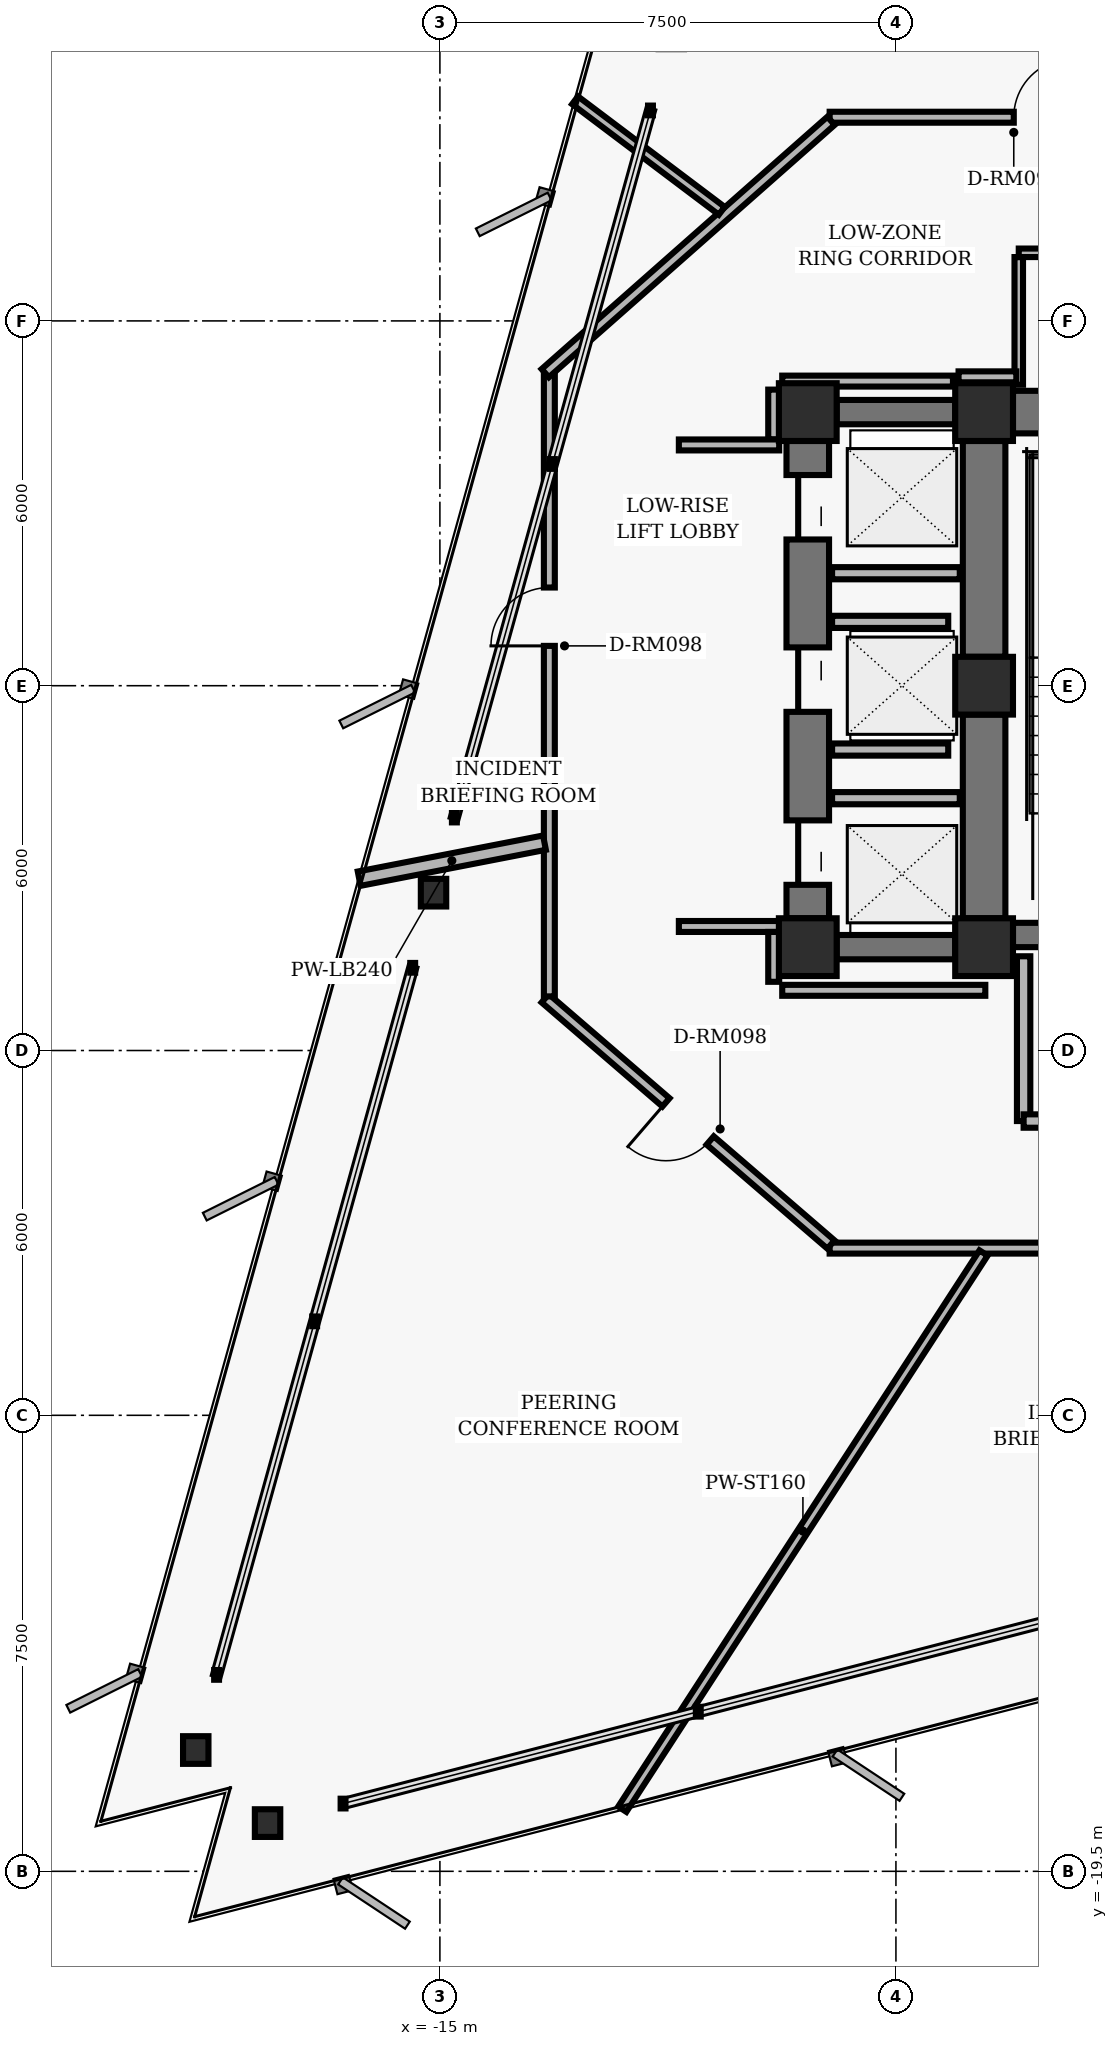
"""IFC4 building model, lengths in metres.
Left out: names, types, materials, properties, quantities, classifications, styles, units other than length and angle.
Written with IfcOpenShell. Run it as: python <this file> out.ifc"""

import sys

from ifc_helpers import new_model, si_unit, direction, frame, frame_2d, origin, origin_2d, place, context, subcontext, project, spatial, rectangle, hollow_rectangle, i_section, extrude, element, fill, save


model = new_model("IFC4")
c1 = context("Model", 3, precision=1e-05, world=origin(), true_north=direction((0.0, 1.0)))
c2 = subcontext(c1, "Body", "Model", "MODEL_VIEW")
j1 = project(units=[si_unit("LENGTHUNIT", "METRE"), si_unit("PLANEANGLEUNIT", "RADIAN")], contexts=[c1])
p1 = place(None, origin())
s1 = spatial("IfcSite", under=j1, at=p1, CompositionType="ELEMENT")
p2 = place(p1, origin())
s2 = spatial("IfcBuilding", under=s1, at=p2, CompositionType="ELEMENT")
p3 = place(p2, frame((0.0, 0.0, 82.56)))
s3 = spatial("IfcBuildingStorey", under=s2, at=p3, CompositionType="ELEMENT", Elevation=82.56)
for number, where, z_axis, x_axis in (
    (1, (-6.05, 4.5, 0.0), (0.0, 0.0, 1.0), (1.0, 0.0, 0.0)),
    (2, (-6.05, 0.0, 0.0), (0.0, 0.0, 1.0), (1.0, 0.0, 0.0)),
    (3, (-6.05, -4.3, 0.0), (0.0, 0.0, 1.0), (1.0, 0.0, 0.0)),
    (4, (-8.95, 4.5, 0.0), (0.0, 0.0, 1.0), (1.0, 0.0, 0.0)),
    (5, (-8.95, -4.3, 0.0), (0.0, 0.0, 1.0), (1.0, 0.0, 0.0)),
):
    element("IfcColumn", number, at=place(p3, frame(where, z_axis=z_axis, x_axis=x_axis)), inside=s3, PredefinedType="COLUMN", context=c2, shape_type="SweptSolid", body=[
        extrude(hollow_rectangle(XDim=0.95, YDim=0.95, WallThickness=0.06, InnerFilletRadius=0.02, OuterFilletRadius=0.04, at=origin_2d()), origin(), (0.0, 0.0, 1.0), 3.04),
    ])
p4 = place(p3, frame((-6.05, 0.475, 0.0), z_axis=(0.0, 0.0, 1.0), x_axis=(0.0, 1.0, 0.0)))
e6 = element("IfcWall", 6, at=p4, inside=s3, PredefinedType="SHEAR", context=c2, shape_type="SweptSolid", body=[
    extrude(rectangle(XDim=3.55, YDim=0.7, at=frame_2d((1.775, 0.0))), origin(), (0.0, 0.0, 1.0), 2.788),
])
p5 = place(p3, frame((-6.05, -3.825, 0.0), z_axis=(0.0, 0.0, 1.0), x_axis=(0.0, 1.0, 0.0)))
e7 = element("IfcWall", 7, at=p5, inside=s3, PredefinedType="SHEAR", context=c2, shape_type="SweptSolid", body=[
    extrude(rectangle(XDim=3.35, YDim=0.7, at=frame_2d((1.675, 0.0))), origin(), (0.0, 0.0, 1.0), 2.788),
])
p6 = place(p3, frame((-5.575, -4.1, 0.0), z_axis=(0.0, 0.0, 1.0), x_axis=(1.0, 0.0, 0.0)))
e8 = element("IfcWall", 8, at=p6, inside=s3, PredefinedType="SHEAR", context=c2, shape_type="SweptSolid", body=[
    extrude(rectangle(XDim=11.15, YDim=0.4, at=frame_2d((5.575, 0.0))), origin(), (0.0, 0.0, 1.0), 2.788),
])
p7 = place(p6, frame((1.305, 0.0, 0.0)))
e9 = element("IfcOpeningElement", 9, at=p7, cuts=e8, PredefinedType="OPENING", context=c2, shape_type="SweptSolid", body=[
    extrude(rectangle(XDim=1.1, YDim=2.04, at=frame_2d((0.55, 1.02))), frame((0.0, 0.21, 0.0), z_axis=(0.0, -1.0, 0.0), x_axis=(1.0, 0.0, 0.0)), (0.0, 0.0, 1.0), 0.42),
])
p8 = place(p6, frame((8.745, 0.0, 0.0)))
e10 = element("IfcOpeningElement", 10, at=p8, cuts=e8, PredefinedType="OPENING", context=c2, shape_type="SweptSolid", body=[
    extrude(rectangle(XDim=1.1, YDim=2.04, at=frame_2d((0.55, 1.02))), frame((0.0, 0.21, 0.0), z_axis=(0.0, -1.0, 0.0), x_axis=(1.0, 0.0, 0.0)), (0.0, 0.0, 1.0), 0.42),
])
p9 = place(p6, frame((4.045, 0.0, 0.0)))
e11 = element("IfcOpeningElement", 11, at=p9, cuts=e8, PredefinedType="OPENING", context=c2, shape_type="SweptSolid", body=[
    extrude(rectangle(XDim=1.06, YDim=2.04, at=frame_2d((0.53, 1.02))), frame((0.0, 0.21, 0.0), z_axis=(0.0, -1.0, 0.0), x_axis=(1.0, 0.0, 0.0)), (0.0, 0.0, 1.0), 0.42),
])
p10 = place(p6, frame((6.045, 0.0, 0.0)))
e12 = element("IfcOpeningElement", 12, at=p10, cuts=e8, PredefinedType="OPENING", context=c2, shape_type="SweptSolid", body=[
    extrude(rectangle(XDim=1.06, YDim=2.04, at=frame_2d((0.53, 1.02))), frame((0.0, 0.21, 0.0), z_axis=(0.0, -1.0, 0.0), x_axis=(1.0, 0.0, 0.0)), (0.0, 0.0, 1.0), 0.42),
])
p11 = place(p3, frame((-5.575, 4.5, 0.0), z_axis=(0.0, 0.0, 1.0), x_axis=(1.0, 0.0, 0.0)))
e13 = element("IfcWall", 13, at=p11, inside=s3, PredefinedType="SHEAR", context=c2, shape_type="SweptSolid", body=[
    extrude(rectangle(XDim=3.525, YDim=0.7, at=frame_2d((1.762, 0.0))), origin(), (0.0, 0.0, 1.0), 2.788),
])
p12 = place(p3, frame((-8.95, -3.825, 0.0), z_axis=(0.0, 0.0, 1.0), x_axis=(0.0, 1.0, 0.0)))
e14 = element("IfcWall", 14, at=p12, inside=s3, PredefinedType="SHEAR", context=c2, shape_type="SweptSolid", body=[
    extrude(rectangle(XDim=7.85, YDim=0.7, at=frame_2d((3.925, 0.0))), origin(), (0.0, 0.0, 1.0), 2.788),
])
p13 = place(p12, frame((0.55, 0.0, 0.0)))
e15 = element("IfcOpeningElement", 15, at=p13, cuts=e14, PredefinedType="OPENING", context=c2, shape_type="SweptSolid", body=[
    extrude(rectangle(XDim=1.06, YDim=2.04, at=frame_2d((0.53, 1.02))), frame((0.0, 0.36, 0.0), z_axis=(0.0, -1.0, 0.0), x_axis=(1.0, 0.0, 0.0)), (0.0, 0.0, 1.0), 0.72),
])
p14 = place(p12, frame((3.395, 0.0, 0.0)))
e16 = element("IfcOpeningElement", 16, at=p14, cuts=e14, PredefinedType="OPENING", context=c2, shape_type="SweptSolid", body=[
    extrude(rectangle(XDim=1.06, YDim=2.04, at=frame_2d((0.53, 1.02))), frame((0.0, 0.36, 0.0), z_axis=(0.0, -1.0, 0.0), x_axis=(1.0, 0.0, 0.0)), (0.0, 0.0, 1.0), 0.72),
])
p15 = place(p12, frame((6.23, 0.0, 0.0)))
e17 = element("IfcOpeningElement", 17, at=p15, cuts=e14, PredefinedType="OPENING", context=c2, shape_type="SweptSolid", body=[
    extrude(rectangle(XDim=1.06, YDim=2.04, at=frame_2d((0.53, 1.02))), frame((0.0, 0.36, 0.0), z_axis=(0.0, -1.0, 0.0), x_axis=(1.0, 0.0, 0.0)), (0.0, 0.0, 1.0), 0.72),
])
for number, where, z_axis, x_axis in (
    (18, (-8.475, 4.5, 0.0), (0.0, 0.0, 1.0), (1.0, 0.0, 0.0)),
    (19, (-8.475, -4.3, 0.0), (0.0, 0.0, 1.0), (1.0, 0.0, 0.0)),
):
    element("IfcWall", number, at=place(p3, frame(where, z_axis=z_axis, x_axis=x_axis)), inside=s3, PredefinedType="SHEAR", context=c2, shape_type="SweptSolid", body=[
        extrude(rectangle(XDim=1.95, YDim=0.4, at=frame_2d((0.975, 0.0))), origin(), (0.0, 0.0, 1.0), 2.788),
    ])
for number, where, z_axis, x_axis in (
    (20, (-15.104, -3.404, 0.0), (0.0, 0.0, 1.0), (1.0, 0.0, 0.0)),
    (21, (-19.015, -17.505, 0.0), (0.0, 0.0, 1.0), (1.0, 0.0, 0.0)),
    (22, (-17.834, -18.707, 0.0), (0.0, 0.0, 1.0), (1.0, 0.0, 0.0)),
):
    element("IfcColumn", number, at=place(p3, frame(where, z_axis=z_axis, x_axis=x_axis)), inside=s3, PredefinedType="COLUMN", context=c2, shape_type="SweptSolid", body=[
        extrude(i_section(OverallWidth=0.418, OverallDepth=0.455, WebThickness=0.042, FlangeThickness=0.068, FilletRadius=0.025, at=origin_2d()), origin(), (0.0, 0.0, 1.0), 3.04),
    ])
p16 = place(p3, frame((-5.4, -7.16, 0.0), z_axis=(0.0, 0.0, 1.0), x_axis=(0.0, 1.0, 0.0)))
e23 = element("IfcWall", 23, at=p16, inside=s3, PredefinedType="PARTITIONING", context=c2, shape_type="SweptSolid", body=[
    extrude(rectangle(XDim=2.71, YDim=0.22, at=frame_2d((1.355, 0.0))), origin(), (0.0, 0.0, 1.0), 2.763),
])
p17 = place(p3, frame((-5.4, -7.16, 0.0), z_axis=(0.0, 0.0, 1.0), x_axis=(1.0, 0.0, 0.0)))
e24 = element("IfcWall", 24, at=p17, inside=s3, PredefinedType="PARTITIONING", context=c2, shape_type="SweptSolid", body=[
    extrude(rectangle(XDim=5.4, YDim=0.22, at=frame_2d((2.7, 0.0))), origin(), (0.0, 0.0, 1.0), 2.763),
])
p18 = place(p17, frame((2.05, 0.0, 0.0)))
e25 = element("IfcOpeningElement", 25, at=p18, cuts=e24, PredefinedType="OPENING", context=c2, shape_type="SweptSolid", body=[
    extrude(rectangle(XDim=1.12, YDim=2.02, at=frame_2d((0.56, 1.01))), frame((0.0, 0.12, 0.0), z_axis=(0.0, -1.0, 0.0), x_axis=(1.0, 0.0, 0.0)), (0.0, 0.0, 1.0), 0.24),
])
p19 = place(p3, frame((-5.48, 4.95, 0.0), z_axis=(0.0, 0.0, 1.0), x_axis=(0.0, 1.0, 0.0)))
e26 = element("IfcWall", 26, at=p19, inside=s3, PredefinedType="PARTITIONING", context=c2, shape_type="SweptSolid", body=[
    extrude(rectangle(XDim=2.1, YDim=0.14, at=frame_2d((1.05, 0.0))), origin(), (0.0, 0.0, 1.0), 2.763),
])
p20 = place(p3, frame((-5.48, 7.12, 0.0), z_axis=(0.0, 0.0, 1.0), x_axis=(1.0, 0.0, 0.0)))
e27 = element("IfcWall", 27, at=p20, inside=s3, PredefinedType="PARTITIONING", context=c2, shape_type="SweptSolid", body=[
    extrude(rectangle(XDim=3.36, YDim=0.14, at=frame_2d((1.68, 0.0))), origin(), (0.0, 0.0, 1.0), 2.763),
])
p21 = place(p20, frame((1.24, 0.0, 0.0)))
e28 = element("IfcOpeningElement", 28, at=p21, cuts=e27, PredefinedType="OPENING", context=c2, shape_type="SweptSolid", body=[
    extrude(rectangle(XDim=0.88, YDim=2.02, at=frame_2d((0.44, 1.01))), frame((0.0, 0.08, 0.0), z_axis=(0.0, -1.0, 0.0), x_axis=(1.0, 0.0, 0.0)), (0.0, 0.0, 1.0), 0.16),
])
for number, where, z_axis, x_axis in (
    (29, (-8.55, -1.85, 0.0), (0.0, 0.0, 1.0), (1.0, 0.0, 0.0)),
    (30, (-8.55, 1.85, 0.0), (0.0, 0.0, 1.0), (1.0, 0.0, 0.0)),
):
    element("IfcWall", number, at=place(p3, frame(where, z_axis=z_axis, x_axis=x_axis)), inside=s3, PredefinedType="PARTITIONING", context=c2, shape_type="SweptSolid", body=[
        extrude(rectangle(XDim=2.1, YDim=0.2, at=frame_2d((1.05, 0.0))), origin(), (0.0, 0.0, 1.0), 2.763),
    ])
for number, where, z_axis, x_axis in (
    (31, (-8.55, -1.05, 0.0), (0.0, 0.0, 1.0), (1.0, 0.0, 0.0)),
    (32, (-8.55, 1.05, 0.0), (0.0, 0.0, 1.0), (1.0, 0.0, 0.0)),
):
    element("IfcWall", number, at=place(p3, frame(where, z_axis=z_axis, x_axis=x_axis)), inside=s3, PredefinedType="PARTITIONING", context=c2, shape_type="SweptSolid", body=[
        extrude(rectangle(XDim=1.91, YDim=0.2, at=frame_2d((0.955, 0.0))), origin(), (0.0, 0.0, 1.0), 2.763),
    ])
p22 = place(p3, frame((-8.59, 9.35, 0.0), z_axis=(0.0, 0.0, 1.0), x_axis=(1.0, 0.0, 0.0)))
e33 = element("IfcWall", 33, at=p22, inside=s3, PredefinedType="PARTITIONING", context=c2, shape_type="SweptSolid", body=[
    extrude(rectangle(XDim=17.18, YDim=0.18, at=frame_2d((8.59, 0.0))), origin(), (0.0, 0.0, 1.0), 2.277),
])
p23 = place(p22, frame((10.261, 0.0, 0.0)))
e34 = element("IfcOpeningElement", 34, at=p23, cuts=e33, PredefinedType="OPENING", context=c2, shape_type="SweptSolid", body=[
    extrude(rectangle(XDim=0.96, YDim=2.02, at=frame_2d((0.48, 1.01))), frame((0.0, 0.1, 0.0), z_axis=(0.0, -1.0, 0.0), x_axis=(1.0, 0.0, 0.0)), (0.0, 0.0, 1.0), 0.2),
])
p24 = place(p22, frame((3.028, 0.0, 0.0)))
e35 = element("IfcOpeningElement", 35, at=p24, cuts=e33, PredefinedType="OPENING", context=c2, shape_type="SweptSolid", body=[
    extrude(rectangle(XDim=0.96, YDim=2.02, at=frame_2d((0.48, 1.01))), frame((0.0, 0.1, 0.0), z_axis=(0.0, -1.0, 0.0), x_axis=(1.0, 0.0, 0.0)), (0.0, 0.0, 1.0), 0.2),
])
p25 = place(p3, frame((8.41, -9.25, 0.0), z_axis=(0.0, 0.0, 1.0), x_axis=(-1.0, 0.0, 0.0)))
e36 = element("IfcWall", 36, at=p25, inside=s3, PredefinedType="PARTITIONING", context=c2, shape_type="SweptSolid", body=[
    extrude(rectangle(XDim=17.0, YDim=0.18, at=frame_2d((8.5, 0.0))), origin(), (0.0, 0.0, 1.0), 2.277),
])
p26 = place(p25, frame((9.888, 0.0, 0.0)))
e37 = element("IfcOpeningElement", 37, at=p26, cuts=e36, PredefinedType="OPENING", context=c2, shape_type="SweptSolid", body=[
    extrude(rectangle(XDim=0.96, YDim=2.02, at=frame_2d((0.48, 1.01))), frame((0.0, 0.1, 0.0), z_axis=(0.0, -1.0, 0.0), x_axis=(1.0, 0.0, 0.0)), (0.0, 0.0, 1.0), 0.2),
])
p27 = place(p25, frame((2.777, 0.0, 0.0)))
e38 = element("IfcOpeningElement", 38, at=p27, cuts=e36, PredefinedType="OPENING", context=c2, shape_type="SweptSolid", body=[
    extrude(rectangle(XDim=0.96, YDim=2.02, at=frame_2d((0.48, 1.01))), frame((0.0, 0.1, 0.0), z_axis=(0.0, -1.0, 0.0), x_axis=(1.0, 0.0, 0.0)), (0.0, 0.0, 1.0), 0.2),
])
p28 = place(p3, frame((-8.568, -9.191, 0.0), z_axis=(0.0, 0.0, 1.0), x_axis=(-0.757556899173, 0.652769135694, 0.0)))
e39 = element("IfcWall", 39, at=p28, inside=s3, PredefinedType="PARTITIONING", context=c2, shape_type="SweptSolid", body=[
    extrude(rectangle(XDim=6.204, YDim=0.18, at=frame_2d((3.102, 0.0))), origin(), (0.0, 0.0, 1.0), 2.763),
])
p29 = place(p28, frame((2.622, 0.0, 0.0)))
e40 = element("IfcOpeningElement", 40, at=p29, cuts=e39, PredefinedType="OPENING", context=c2, shape_type="SweptSolid", body=[
    extrude(rectangle(XDim=0.96, YDim=2.02, at=frame_2d((0.48, 1.01))), frame((0.0, 0.1, 0.0), z_axis=(0.0, -1.0, 0.0), x_axis=(1.0, 0.0, 0.0)), (0.0, 0.0, 1.0), 0.2),
])
p30 = place(p3, frame((-13.2, -5.11, 0.0), z_axis=(0.0, 0.0, 1.0), x_axis=(0.0, 1.0, 0.0)))
e41 = element("IfcWall", 41, at=p30, inside=s3, PredefinedType="PARTITIONING", context=c2, shape_type="SweptSolid", body=[
    extrude(rectangle(XDim=10.22, YDim=0.18, at=frame_2d((5.11, 0.0))), origin(), (0.0, 0.0, 1.0), 2.143),
])
p31 = place(p30, frame((5.765, 0.0, 0.0)))
e42 = element("IfcOpeningElement", 42, at=p31, cuts=e41, PredefinedType="OPENING", context=c2, shape_type="SweptSolid", body=[
    extrude(rectangle(XDim=0.96, YDim=2.02, at=frame_2d((0.48, 1.01))), frame((0.0, 0.1, 0.0), z_axis=(0.0, -1.0, 0.0), x_axis=(1.0, 0.0, 0.0)), (0.0, 0.0, 1.0), 0.2),
])
p32 = place(p3, frame((-13.268, 5.14, 0.0), z_axis=(0.0, 0.0, 1.0), x_axis=(0.749626463267, 0.66186113768, 0.0)))
e43 = element("IfcWall", 43, at=p32, inside=s3, PredefinedType="PARTITIONING", context=c2, shape_type="SweptSolid", body=[
    extrude(rectangle(XDim=6.27, YDim=0.18, at=frame_2d((3.135, 0.0))), origin(), (0.0, 0.0, 1.0), 2.763),
])
p33 = place(p3, frame((-9.51, 4.87, 0.0), z_axis=(0.0, 0.0, 1.0), x_axis=(0.0, -1.0, 0.0)))
e44 = element("IfcWall", 44, at=p33, inside=s3, PredefinedType="PARTITIONING", context=c2, shape_type="SweptSolid", body=[
    extrude(rectangle(XDim=0.82, YDim=0.18, at=frame_2d((0.41, 0.0))), origin(), (0.0, 0.0, 1.0), 2.277),
])
p34 = place(p3, frame((-9.42, 3.96, 0.0), z_axis=(0.0, 0.0, 1.0), x_axis=(-1.0, 0.0, 0.0)))
e45 = element("IfcWall", 45, at=p34, inside=s3, PredefinedType="PARTITIONING", context=c2, shape_type="SweptSolid", body=[
    extrude(rectangle(XDim=1.65, YDim=0.18, at=frame_2d((0.825, 0.0))), origin(), (0.0, 0.0, 1.0), 2.763),
])
p35 = place(p3, frame((-11.07, -3.96, 0.0), z_axis=(0.0, 0.0, 1.0), x_axis=(1.0, 0.0, 0.0)))
e46 = element("IfcWall", 46, at=p35, inside=s3, PredefinedType="PARTITIONING", context=c2, shape_type="SweptSolid", body=[
    extrude(rectangle(XDim=1.65, YDim=0.18, at=frame_2d((0.825, 0.0))), origin(), (0.0, 0.0, 1.0), 2.048),
])
p36 = place(p3, frame((-9.51, -4.05, 0.0), z_axis=(0.0, 0.0, 1.0), x_axis=(0.0, -1.0, 0.0)))
e47 = element("IfcWall", 47, at=p36, inside=s3, PredefinedType="PARTITIONING", context=c2, shape_type="SweptSolid", body=[
    extrude(rectangle(XDim=0.82, YDim=0.18, at=frame_2d((0.41, 0.0))), origin(), (0.0, 0.0, 1.0), 2.763),
])
p37 = place(p3, frame((-9.37, -5.01, 0.0), z_axis=(0.0, 0.0, 1.0), x_axis=(1.0, 0.0, 0.0)))
e48 = element("IfcWall", 48, at=p37, inside=s3, PredefinedType="PARTITIONING", context=c2, shape_type="SweptSolid", body=[
    extrude(rectangle(XDim=3.34, YDim=0.18, at=frame_2d((1.67, 0.0))), origin(), (0.0, 0.0, 1.0), 2.763),
])
p38 = place(p3, frame((-5.52, 5.08, 0.0), z_axis=(0.0, 0.0, 1.0), x_axis=(-1.0, 0.0, 0.0)))
e49 = element("IfcWall", 49, at=p38, inside=s3, PredefinedType="PARTITIONING", context=c2, shape_type="SweptSolid", body=[
    extrude(rectangle(XDim=0.95, YDim=0.18, at=frame_2d((0.475, 0.0))), origin(), (0.0, 0.0, 1.0), 2.763),
])
p39 = place(p3, frame((-6.562, 5.01, 0.0), z_axis=(0.0, 0.0, 1.0), x_axis=(-1.0, 0.0, 0.0)))
e50 = element("IfcWall", 50, at=p39, inside=s3, PredefinedType="PARTITIONING", context=c2, shape_type="SweptSolid", body=[
    extrude(rectangle(XDim=2.808, YDim=0.18, at=frame_2d((1.404, 0.0))), origin(), (0.0, 0.0, 1.0), 2.763),
])
p40 = place(p3, frame((-13.28, -2.581, 0.0), z_axis=(0.0, 0.0, 1.0), x_axis=(-0.98161907283, -0.190850716155, 0.0)))
e51 = element("IfcWall", 51, at=p40, inside=s3, PredefinedType="PARTITIONING", context=c2, shape_type="SweptSolid", body=[
    extrude(rectangle(XDim=3.105, YDim=0.24, at=frame_2d((1.552, 0.0))), origin(), (0.0, 0.0, 1.0), 2.763),
])
p41 = place(p3, frame((-6.059, -9.33, 0.0), z_axis=(0.0, 0.0, 1.0), x_axis=(-0.544635087887, -0.838673131227, 0.0)))
e52 = element("IfcWall", 52, at=p41, inside=s3, PredefinedType="PARTITIONING", context=c2, shape_type="SweptSolid", body=[
    extrude(rectangle(XDim=10.908, YDim=0.16, at=frame_2d((5.454, 0.0))), origin(), (0.0, 0.0, 1.0), 2.763),
])
p42 = place(p3, frame((-1.833, 9.43, 0.0), z_axis=(0.0, 0.0, 1.0), x_axis=(-0.190802669454, 0.981628413061, 0.0)))
e53 = element("IfcWall", 53, at=p42, inside=s3, PredefinedType="PARTITIONING", context=c2, shape_type="SweptSolid", body=[
    extrude(rectangle(XDim=17.364, YDim=0.24, at=frame_2d((8.682, 0.0))), origin(), (0.0, 0.0, 1.0), 2.763),
])
p43 = place(p3, frame((-10.365, 7.81, 0.0), z_axis=(0.0, 0.0, 1.0), x_axis=(-0.79865006228, 0.601795711201, 0.0)))
e54 = element("IfcWall", 54, at=p43, inside=s3, PredefinedType="PARTITIONING", context=c2, shape_type="SweptSolid", body=[
    extrude(rectangle(XDim=3.021, YDim=0.16, at=frame_2d((1.511, 0.0))), origin(), (0.0, 0.0, 1.0), 2.763),
])
p44 = place(p13, origin())
e55 = element("IfcDoor", 55, at=p44, inside=s3, OperationType="SLIDING_TO_LEFT", PredefinedType="DOOR", context=c2, shape_type="SweptSolid", body=[
    extrude(rectangle(XDim=1.06, YDim=2.04, at=frame_2d((0.53, 1.02))), frame((0.0, 0.025, 0.0), z_axis=(0.0, -1.0, 0.0), x_axis=(1.0, 0.0, 0.0)), (0.0, 0.0, 1.0), 0.05),
])
fill(e15, e55)
p45 = place(p14, origin())
e56 = element("IfcDoor", 56, at=p45, inside=s3, OperationType="SLIDING_TO_RIGHT", PredefinedType="DOOR", context=c2, shape_type="SweptSolid", body=[
    extrude(rectangle(XDim=1.06, YDim=2.04, at=frame_2d((0.53, 1.02))), frame((0.0, 0.025, 0.0), z_axis=(0.0, -1.0, 0.0), x_axis=(1.0, 0.0, 0.0)), (0.0, 0.0, 1.0), 0.05),
])
fill(e16, e56)
p46 = place(p15, origin())
e57 = element("IfcDoor", 57, at=p46, inside=s3, OperationType="SLIDING_TO_LEFT", PredefinedType="DOOR", context=c2, shape_type="SweptSolid", body=[
    extrude(rectangle(XDim=1.06, YDim=2.04, at=frame_2d((0.53, 1.02))), frame((0.0, 0.025, 0.0), z_axis=(0.0, -1.0, 0.0), x_axis=(1.0, 0.0, 0.0)), (0.0, 0.0, 1.0), 0.05),
])
fill(e17, e57)
p47 = place(p29, origin())
e58 = element("IfcDoor", 58, at=p47, inside=s3, OperationType="SINGLE_SWING_RIGHT", PredefinedType="DOOR", context=c2, shape_type="SweptSolid", body=[
    extrude(rectangle(XDim=0.96, YDim=2.02, at=frame_2d((0.48, 1.01))), frame((0.0, 0.025, 0.0), z_axis=(0.0, -1.0, 0.0), x_axis=(1.0, 0.0, 0.0)), (0.0, 0.0, 1.0), 0.05),
])
fill(e40, e58)
p48 = place(p24, origin())
e59 = element("IfcDoor", 59, at=p48, inside=s3, OperationType="SINGLE_SWING_RIGHT", PredefinedType="DOOR", context=c2, shape_type="SweptSolid", body=[
    extrude(rectangle(XDim=0.96, YDim=2.02, at=frame_2d((0.48, 1.01))), frame((0.0, 0.025, 0.0), z_axis=(0.0, -1.0, 0.0), x_axis=(1.0, 0.0, 0.0)), (0.0, 0.0, 1.0), 0.05),
])
fill(e35, e59)
p49 = place(p31, origin())
e60 = element("IfcDoor", 60, at=p49, inside=s3, OperationType="SINGLE_SWING_LEFT", PredefinedType="DOOR", context=c2, shape_type="SweptSolid", body=[
    extrude(rectangle(XDim=0.96, YDim=2.02, at=frame_2d((0.48, 1.01))), frame((0.0, 0.025, 0.0), z_axis=(0.0, -1.0, 0.0), x_axis=(1.0, 0.0, 0.0)), (0.0, 0.0, 1.0), 0.05),
])
fill(e42, e60)
save(model, sys.argv[1])
